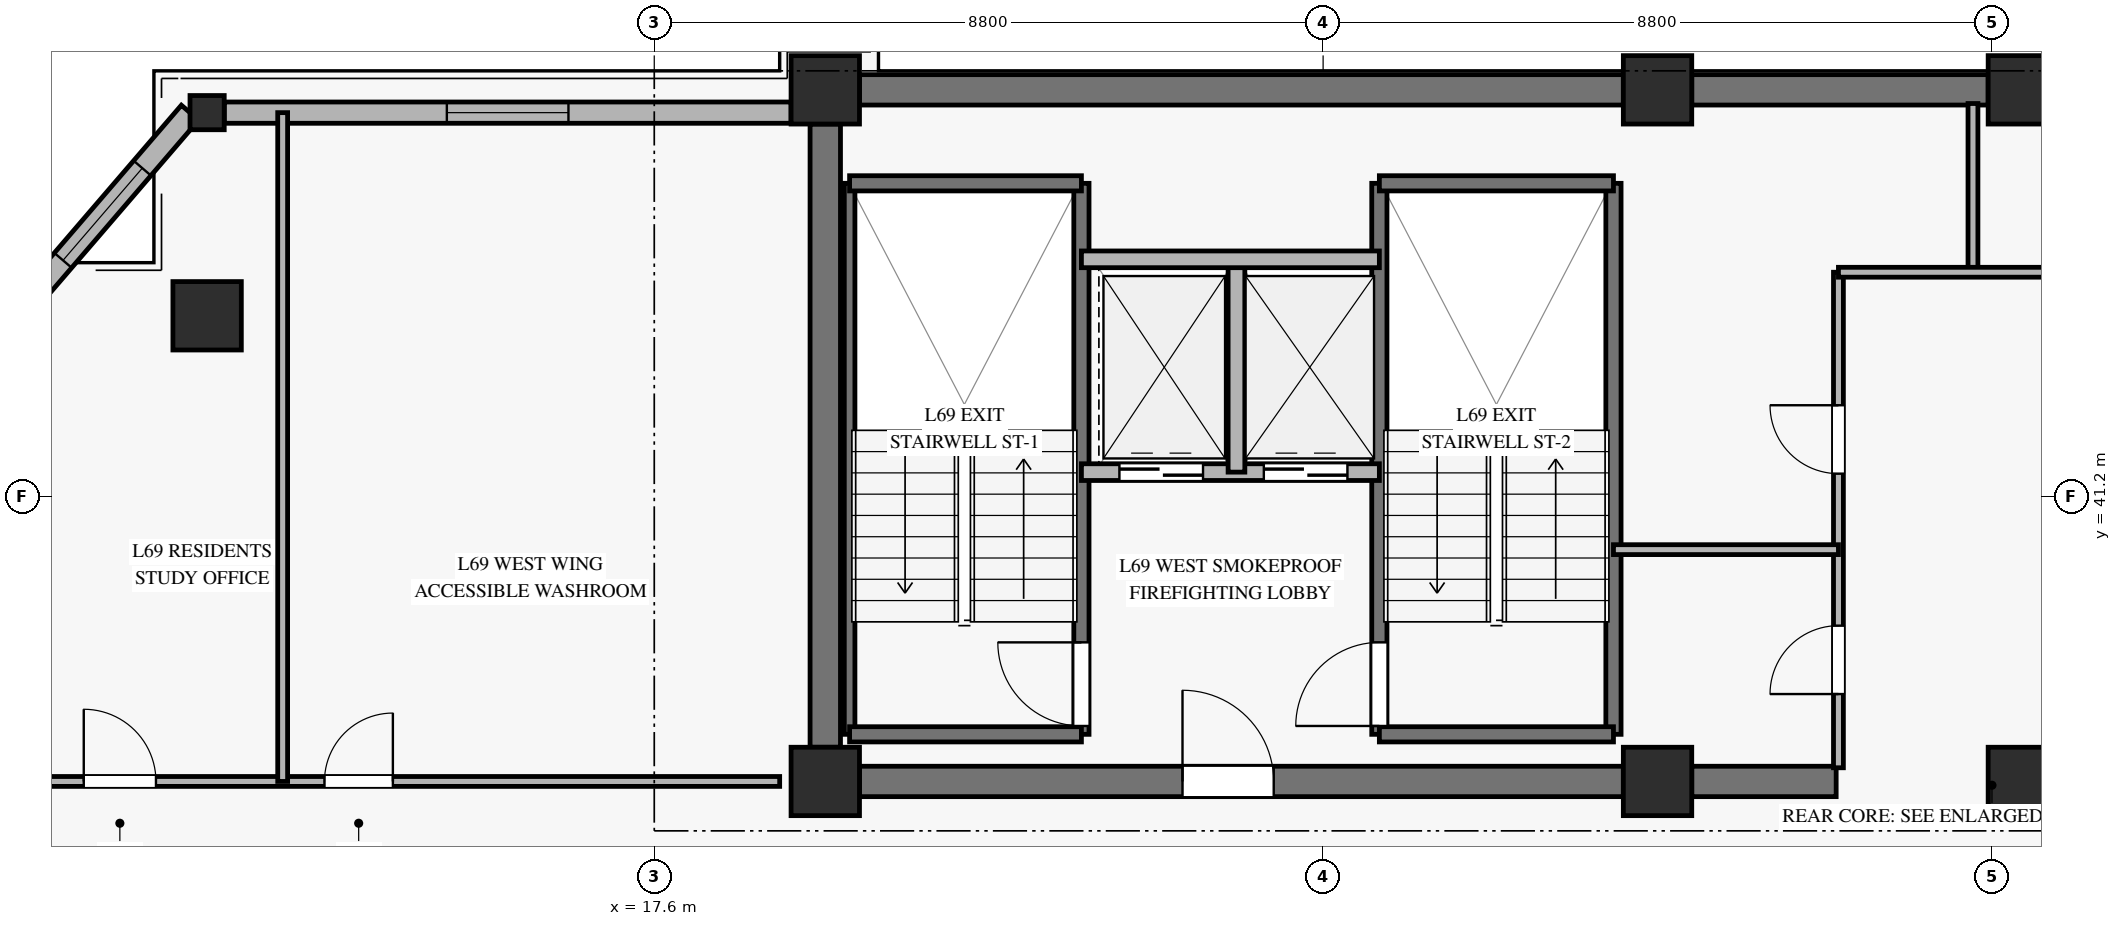
"""IFC4 building model, lengths in metres.
Left out: names, types, materials, properties, quantities, classifications, styles, units other than length and angle.
Written with IfcOpenShell. Run it as: python <this file> out.ifc"""

import sys

from ifc_helpers import new_model, si_unit, direction, frame, frame_2d, origin, origin_2d, place, context, subcontext, project, spatial, rectangle, hollow_rectangle, extrude, source, transform, mapped, element, fill, save


model = new_model("IFC4")
c1 = context("Model", 3, precision=1e-05, world=origin(), true_north=direction((0.0, 1.0)))
c2 = subcontext(c1, "Body", "Model", "MODEL_VIEW")
j1 = project(units=[si_unit("LENGTHUNIT", "METRE"), si_unit("PLANEANGLEUNIT", "RADIAN")], contexts=[c1])
p1 = place(None, origin())
s1 = spatial("IfcSite", under=j1, at=p1, CompositionType="ELEMENT")
p2 = place(p1, origin())
s2 = spatial("IfcBuilding", under=s1, at=p2, CompositionType="ELEMENT")
p3 = place(p2, frame((0.0, 0.0, 268.9)))
s3 = spatial("IfcBuildingStorey", under=s2, at=p3, CompositionType="ELEMENT", Elevation=268.9)
m1 = source(origin(), c2, "Body", "SweptSolid", [
    extrude(rectangle(XDim=0.9, YDim=0.9, at=origin_2d()), origin(), (0.0, 0.0, 1.0), 3.185),
])
for number, where, z_axis, x_axis in (
    (1, (19.85, 37.45, 0.0), (0.0, 0.0, 1.0), (1.0, 0.0, 0.0)),
    (2, (19.85, 46.55, 0.0), (0.0, 0.0, 1.0), (1.0, 0.0, 0.0)),
    (3, (30.8, 37.45, 0.0), (0.0, 0.0, 1.0), (1.0, 0.0, 0.0)),
    (4, (30.8, 46.55, 0.0), (0.0, 0.0, 1.0), (1.0, 0.0, 0.0)),
    (5, (35.6, 37.45, 0.0), (0.0, 0.0, 1.0), (1.0, 0.0, 0.0)),
    (6, (35.6, 46.55, 0.0), (0.0, 0.0, 1.0), (1.0, 0.0, 0.0)),
):
    element("IfcColumn", number, at=place(p3, frame(where, z_axis=z_axis, x_axis=x_axis)), inside=s3, PredefinedType="PILASTER", context=c2, shape_type="MappedRepresentation", body=[
        mapped(m1, transform((0.0, 0.0, 0.0), x_axis=(1.0, 0.0, 0.0), y_axis=(0.0, 1.0, 0.0), z_axis=(0.0, 0.0, 1.0), scale=1.0)),
    ])
p4 = place(p3, frame((20.3, 46.55, 0.0), z_axis=(0.0, 0.0, 1.0), x_axis=(1.0, 0.0, 0.0)))
e7 = element("IfcWall", 7, at=p4, inside=s3, PredefinedType="SHEAR", context=c2, shape_type="SweptSolid", body=[
    extrude(rectangle(XDim=10.05, YDim=0.4, at=frame_2d((5.025, 0.0))), origin(), (0.0, 0.0, 1.0), 3.185),
])
p5 = place(p3, frame((31.25, 46.55, 0.0), z_axis=(0.0, 0.0, 1.0), x_axis=(1.0, 0.0, 0.0)))
e8 = element("IfcWall", 8, at=p5, inside=s3, PredefinedType="SHEAR", context=c2, shape_type="SweptSolid", body=[
    extrude(rectangle(XDim=3.9, YDim=0.4, at=frame_2d((1.95, 0.0))), origin(), (0.0, 0.0, 1.0), 3.185),
])
p6 = place(p3, frame((20.3, 37.45, 0.0), z_axis=(0.0, 0.0, 1.0), x_axis=(1.0, 0.0, 0.0)))
e9 = element("IfcWall", 9, at=p6, inside=s3, PredefinedType="SHEAR", context=c2, shape_type="SweptSolid", body=[
    extrude(rectangle(XDim=10.05, YDim=0.4, at=frame_2d((5.025, 0.0))), origin(), (0.0, 0.0, 1.0), 3.185),
])
p7 = place(p6, frame((4.25, 0.0, 0.0)))
e10 = element("IfcOpeningElement", 10, at=p7, cuts=e9, PredefinedType="OPENING", context=c2, shape_type="SweptSolid", body=[
    extrude(rectangle(XDim=1.2, YDim=2.15, at=frame_2d((0.6, 1.075))), frame((0.0, 0.21, 0.0), z_axis=(0.0, -1.0, 0.0), x_axis=(1.0, 0.0, 0.0)), (0.0, 0.0, 1.0), 0.42),
])
p8 = place(p3, frame((31.25, 37.45, 0.0), z_axis=(0.0, 0.0, 1.0), x_axis=(1.0, 0.0, 0.0)))
e11 = element("IfcWall", 11, at=p8, inside=s3, PredefinedType="SHEAR", context=c2, shape_type="SweptSolid", body=[
    extrude(rectangle(XDim=1.9, YDim=0.4, at=frame_2d((0.95, 0.0))), origin(), (0.0, 0.0, 1.0), 3.185),
])
p9 = place(p3, frame((19.85, 37.9, 0.0), z_axis=(0.0, 0.0, 1.0), x_axis=(0.0, 1.0, 0.0)))
e12 = element("IfcWall", 12, at=p9, inside=s3, PredefinedType="SHEAR", context=c2, shape_type="SweptSolid", body=[
    extrude(rectangle(XDim=8.2, YDim=0.4, at=frame_2d((4.1, 0.0))), origin(), (0.0, 0.0, 1.0), 3.185),
])
m2 = source(origin(), c2, "Body", "SweptSolid", [
    extrude(hollow_rectangle(XDim=0.9, YDim=0.9, WallThickness=0.04, at=origin_2d()), origin(), (0.0, 0.0, 1.0), 3.185),
])
p10 = place(p3, frame((11.717, 43.577, 0.0), z_axis=(0.0, 0.0, 1.0), x_axis=(1.0, 0.0, 0.0)))
e13 = element("IfcColumn", 13, at=p10, inside=s3, PredefinedType="COLUMN", context=c2, shape_type="MappedRepresentation", body=[
    mapped(m2, transform((0.0, 0.0, 0.0), x_axis=(1.0, 0.0, 0.0), y_axis=(0.0, 1.0, 0.0), z_axis=(0.0, 0.0, 1.0), scale=1.0)),
])
m3 = source(origin(), c2, "Body", "SweptSolid", [
    extrude(hollow_rectangle(XDim=0.45, YDim=0.45, WallThickness=0.022, at=origin_2d()), origin(), (0.0, 0.0, 1.0), 3.185),
])
p11 = place(p3, frame((11.717, 46.25, 0.0), z_axis=(0.0, 0.0, 1.0), x_axis=(1.0, 0.0, 0.0)))
e14 = element("IfcColumn", 14, at=p11, inside=s3, PredefinedType="COLUMN", context=c2, shape_type="MappedRepresentation", body=[
    mapped(m3, transform((0.0, 0.0, 0.0), x_axis=(1.0, 0.0, 0.0), y_axis=(0.0, 1.0, 0.0), z_axis=(0.0, 0.0, 1.0), scale=1.0)),
])
p12 = place(p3, frame((11.942, 46.25, 0.0), z_axis=(0.0, 0.0, 1.0), x_axis=(1.0, 0.0, 0.0)))
e15 = element("IfcWall", 15, at=p12, inside=s3, PredefinedType="SOLIDWALL", context=c2, shape_type="SweptSolid", body=[
    extrude(rectangle(XDim=7.458, YDim=0.28, at=frame_2d((3.729, 0.0))), origin(), (0.0, 0.0, 1.0), 2.815),
])
p13 = place(p12, frame((2.929, 0.0, 0.45)))
e16 = element("IfcOpeningElement", 16, at=p13, cuts=e15, PredefinedType="OPENING", context=c2, shape_type="SweptSolid", body=[
    extrude(rectangle(XDim=1.6, YDim=2.0, at=frame_2d((0.8, 1.0))), frame((0.0, 0.15, 0.0), z_axis=(0.0, -1.0, 0.0), x_axis=(1.0, 0.0, 0.0)), (0.0, 0.0, 1.0), 0.3),
])
p14 = place(p3, frame((11.492, 46.25, 0.0), z_axis=(0.0, 0.0, 1.0), x_axis=(-0.651874424669, -0.75832693112, 0.0)))
e17 = element("IfcWall", 17, at=p14, inside=s3, PredefinedType="SOLIDWALL", context=c2, shape_type="SweptSolid", body=[
    extrude(rectangle(XDim=3.525, YDim=0.3, at=frame_2d((1.762, 0.0))), origin(), (0.0, 0.0, 1.0), 2.815),
])
p15 = place(p14, frame((0.963, 0.0, 0.45)))
e18 = element("IfcOpeningElement", 18, at=p15, cuts=e17, PredefinedType="OPENING", context=c2, shape_type="SweptSolid", body=[
    extrude(rectangle(XDim=1.6, YDim=2.0, at=frame_2d((0.8, 1.0))), frame((0.0, 0.16, 0.0), z_axis=(0.0, -1.0, 0.0), x_axis=(1.0, 0.0, 0.0)), (0.0, 0.0, 1.0), 0.32),
])
p16 = place(p3, frame((20.17, 38.07, 0.0), z_axis=(0.0, 0.0, 1.0), x_axis=(0.0, 1.0, 0.0)))
e19 = element("IfcWall", 19, at=p16, inside=s3, PredefinedType="SOLIDWALL", context=c2, shape_type="SweptSolid", body=[
    extrude(rectangle(XDim=7.25, YDim=0.14, at=frame_2d((3.625, 0.0))), origin(), (0.0, 0.0, 1.0), 3.4),
])
p17 = place(p3, frame((23.22, 38.07, 0.0), z_axis=(0.0, 0.0, 1.0), x_axis=(0.0, 1.0, 0.0)))
e20 = element("IfcWall", 20, at=p17, inside=s3, PredefinedType="SOLIDWALL", context=c2, shape_type="SweptSolid", body=[
    extrude(rectangle(XDim=7.25, YDim=0.2, at=frame_2d((3.625, 0.0))), origin(), (0.0, 0.0, 1.0), 3.4),
])
p18 = place(p17, frame((0.11, 0.0, 0.0)))
e21 = element("IfcOpeningElement", 21, at=p18, cuts=e20, PredefinedType="OPENING", context=c2, shape_type="SweptSolid", body=[
    extrude(rectangle(XDim=1.1, YDim=2.15, at=frame_2d((0.55, 1.075))), frame((0.0, 0.11, 0.0), z_axis=(0.0, -1.0, 0.0), x_axis=(1.0, 0.0, 0.0)), (0.0, 0.0, 1.0), 0.22),
])
for number, where, z_axis, x_axis in (
    (22, (20.17, 45.32, 0.0), (0.0, 0.0, 1.0), (1.0, 0.0, 0.0)),
    (23, (20.17, 38.07, 0.0), (0.0, 0.0, 1.0), (1.0, 0.0, 0.0)),
):
    element("IfcWall", number, at=place(p3, frame(where, z_axis=z_axis, x_axis=x_axis)), inside=s3, PredefinedType="SOLIDWALL", context=c2, shape_type="SweptSolid", body=[
        extrude(rectangle(XDim=3.05, YDim=0.2, at=frame_2d((1.525, 0.0))), origin(), (0.0, 0.0, 1.0), 3.4),
    ])
p19 = place(p3, frame((27.14, 38.07, 0.0), z_axis=(0.0, 0.0, 1.0), x_axis=(0.0, 1.0, 0.0)))
e24 = element("IfcWall", 24, at=p19, inside=s3, PredefinedType="SOLIDWALL", context=c2, shape_type="SweptSolid", body=[
    extrude(rectangle(XDim=7.25, YDim=0.2, at=frame_2d((3.625, 0.0))), origin(), (0.0, 0.0, 1.0), 3.4),
])
p20 = place(p19, frame((0.11, 0.0, 0.0)))
e25 = element("IfcOpeningElement", 25, at=p20, cuts=e24, PredefinedType="OPENING", context=c2, shape_type="SweptSolid", body=[
    extrude(rectangle(XDim=1.1, YDim=2.15, at=frame_2d((0.55, 1.075))), frame((0.0, 0.11, 0.0), z_axis=(0.0, -1.0, 0.0), x_axis=(1.0, 0.0, 0.0)), (0.0, 0.0, 1.0), 0.22),
])
p21 = place(p3, frame((30.22, 38.07, 0.0), z_axis=(0.0, 0.0, 1.0), x_axis=(0.0, 1.0, 0.0)))
e26 = element("IfcWall", 26, at=p21, inside=s3, PredefinedType="SOLIDWALL", context=c2, shape_type="SweptSolid", body=[
    extrude(rectangle(XDim=7.25, YDim=0.2, at=frame_2d((3.625, 0.0))), origin(), (0.0, 0.0, 1.0), 3.4),
])
for number, where, z_axis, x_axis in (
    (27, (27.14, 45.32, 0.0), (0.0, 0.0, 1.0), (1.0, 0.0, 0.0)),
    (28, (27.14, 38.07, 0.0), (0.0, 0.0, 1.0), (1.0, 0.0, 0.0)),
):
    element("IfcWall", number, at=place(p3, frame(where, z_axis=z_axis, x_axis=x_axis)), inside=s3, PredefinedType="SOLIDWALL", context=c2, shape_type="SweptSolid", body=[
        extrude(rectangle(XDim=3.08, YDim=0.2, at=frame_2d((1.54, 0.0))), origin(), (0.0, 0.0, 1.0), 3.4),
    ])
p22 = place(p3, frame((23.22, 41.52, 0.0), z_axis=(0.0, 0.0, 1.0), x_axis=(1.0, 0.0, 0.0)))
e29 = element("IfcWall", 29, at=p22, inside=s3, PredefinedType="SOLIDWALL", context=c2, shape_type="SweptSolid", body=[
    extrude(rectangle(XDim=3.92, YDim=0.22, at=frame_2d((1.96, 0.0))), origin(), (0.0, 0.0, 1.0), 3.185),
])
p23 = place(p22, frame((0.5, 0.0, 0.0)))
e30 = element("IfcOpeningElement", 30, at=p23, cuts=e29, PredefinedType="OPENING", context=c2, shape_type="SweptSolid", body=[
    extrude(rectangle(XDim=1.1, YDim=2.2, at=frame_2d((0.55, 1.1))), frame((0.0, 0.12, 0.0), z_axis=(0.0, -1.0, 0.0), x_axis=(1.0, 0.0, 0.0)), (0.0, 0.0, 1.0), 0.24),
])
p24 = place(p22, frame((2.4, 0.0, 0.0)))
e31 = element("IfcOpeningElement", 31, at=p24, cuts=e29, PredefinedType="OPENING", context=c2, shape_type="SweptSolid", body=[
    extrude(rectangle(XDim=1.1, YDim=2.2, at=frame_2d((0.55, 1.1))), frame((0.0, 0.12, 0.0), z_axis=(0.0, -1.0, 0.0), x_axis=(1.0, 0.0, 0.0)), (0.0, 0.0, 1.0), 0.24),
])
p25 = place(p3, frame((25.26, 41.52, 0.0), z_axis=(0.0, 0.0, 1.0), x_axis=(0.0, 1.0, 0.0)))
e32 = element("IfcWall", 32, at=p25, inside=s3, PredefinedType="SOLIDWALL", context=c2, shape_type="SweptSolid", body=[
    extrude(rectangle(XDim=2.8, YDim=0.22, at=frame_2d((1.4, 0.0))), origin(), (0.0, 0.0, 1.0), 3.185),
])
p26 = place(p3, frame((23.22, 44.32, 0.0), z_axis=(0.0, 0.0, 1.0), x_axis=(1.0, 0.0, 0.0)))
e33 = element("IfcWall", 33, at=p26, inside=s3, PredefinedType="SOLIDWALL", context=c2, shape_type="SweptSolid", body=[
    extrude(rectangle(XDim=3.92, YDim=0.22, at=frame_2d((1.96, 0.0))), origin(), (0.0, 0.0, 1.0), 3.185),
])
p27 = place(p3, frame((33.18, 37.63, 0.0), z_axis=(0.0, 0.0, 1.0), x_axis=(0.0, 1.0, 0.0)))
e34 = element("IfcWall", 34, at=p27, inside=s3, PredefinedType="PARTITIONING", context=c2, shape_type="SweptSolid", body=[
    extrude(rectangle(XDim=6.52, YDim=0.13, at=frame_2d((3.26, 0.0))), origin(), (0.0, 0.0, 1.0), 2.27),
])
p28 = place(p27, frame((0.97, 0.0, 0.0)))
e35 = element("IfcOpeningElement", 35, at=p28, cuts=e34, PredefinedType="OPENING", context=c2, shape_type="SweptSolid", body=[
    extrude(rectangle(XDim=0.9, YDim=2.1, at=frame_2d((0.45, 1.05))), frame((0.0, 0.075, 0.0), z_axis=(0.0, -1.0, 0.0), x_axis=(1.0, 0.0, 0.0)), (0.0, 0.0, 1.0), 0.15),
])
p29 = place(p27, frame((3.87, 0.0, 0.0)))
e36 = element("IfcOpeningElement", 36, at=p29, cuts=e34, PredefinedType="OPENING", context=c2, shape_type="SweptSolid", body=[
    extrude(rectangle(XDim=0.9, YDim=2.1, at=frame_2d((0.45, 1.05))), frame((0.0, 0.075, 0.0), z_axis=(0.0, -1.0, 0.0), x_axis=(1.0, 0.0, 0.0)), (0.0, 0.0, 1.0), 0.15),
])
p30 = place(p3, frame((34.95, 44.15, 0.0), z_axis=(0.0, 0.0, 1.0), x_axis=(0.0, 1.0, 0.0)))
e37 = element("IfcWall", 37, at=p30, inside=s3, PredefinedType="PARTITIONING", context=c2, shape_type="SweptSolid", body=[
    extrude(rectangle(XDim=2.22, YDim=0.13, at=frame_2d((1.11, 0.0))), origin(), (0.0, 0.0, 1.0), 3.185),
])
p31 = place(p3, frame((33.18, 44.15, 0.0), z_axis=(0.0, 0.0, 1.0), x_axis=(1.0, 0.0, 0.0)))
e38 = element("IfcWall", 38, at=p31, inside=s3, PredefinedType="PARTITIONING", context=c2, shape_type="SweptSolid", body=[
    extrude(rectangle(XDim=2.94, YDim=0.13, at=frame_2d((1.47, 0.0))), origin(), (0.0, 0.0, 1.0), 2.47),
])
p32 = place(p3, frame((30.22, 40.5, 0.0), z_axis=(0.0, 0.0, 1.0), x_axis=(1.0, 0.0, 0.0)))
e39 = element("IfcWall", 39, at=p32, inside=s3, PredefinedType="PARTITIONING", context=c2, shape_type="SweptSolid", body=[
    extrude(rectangle(XDim=2.96, YDim=0.13, at=frame_2d((1.48, 0.0))), origin(), (0.0, 0.0, 1.0), 2.47),
])
p33 = place(p3, frame((9.194, 37.45, 0.0), z_axis=(0.0, 0.0, 1.0), x_axis=(1.0, 0.0, 0.0)))
e40 = element("IfcWall", 40, at=p33, inside=s3, PredefinedType="PARTITIONING", context=c2, shape_type="SweptSolid", body=[
    extrude(rectangle(XDim=10.056, YDim=0.13, at=frame_2d((5.028, 0.0))), origin(), (0.0, 0.0, 1.0), 2.82),
])
p34 = place(p33, frame((0.9, 0.0, 0.0)))
e41 = element("IfcOpeningElement", 41, at=p34, cuts=e40, PredefinedType="OPENING", context=c2, shape_type="SweptSolid", body=[
    extrude(rectangle(XDim=0.95, YDim=2.1, at=frame_2d((0.475, 1.05))), frame((0.0, 0.075, 0.0), z_axis=(0.0, -1.0, 0.0), x_axis=(1.0, 0.0, 0.0)), (0.0, 0.0, 1.0), 0.15),
])
p35 = place(p33, frame((4.067, 0.0, 0.0)))
e42 = element("IfcOpeningElement", 42, at=p35, cuts=e40, PredefinedType="OPENING", context=c2, shape_type="SweptSolid", body=[
    extrude(rectangle(XDim=0.9, YDim=2.1, at=frame_2d((0.45, 1.05))), frame((0.0, 0.075, 0.0), z_axis=(0.0, -1.0, 0.0), x_axis=(1.0, 0.0, 0.0)), (0.0, 0.0, 1.0), 0.15),
])
p36 = place(p3, frame((12.711, 37.45, 0.0), z_axis=(0.0, 0.0, 1.0), x_axis=(0.0, 1.0, 0.0)))
e43 = element("IfcWall", 43, at=p36, inside=s3, PredefinedType="PARTITIONING", context=c2, shape_type="SweptSolid", body=[
    extrude(rectangle(XDim=8.8, YDim=0.13, at=frame_2d((4.4, 0.0))), origin(), (0.0, 0.0, 1.0), 3.185),
])
m4 = source(origin(), c2, "Body", "SweptSolid", [
    extrude(rectangle(XDim=1.6, YDim=2.0, at=frame_2d((0.8, 1.0))), frame((0.0, 0.03, 0.0), z_axis=(0.0, -1.0, 0.0), x_axis=(1.0, 0.0, 0.0)), (0.0, 0.0, 1.0), 0.06),
])
p37 = place(p13, origin())
e44 = element("IfcWindow", 44, at=p37, inside=s3, PartitioningType="SINGLE_PANEL", PredefinedType="WINDOW", context=c2, shape_type="MappedRepresentation", body=[
    mapped(m4, transform((0.0, 0.0, 0.0), x_axis=(1.0, 0.0, 0.0), y_axis=(0.0, 1.0, 0.0), z_axis=(0.0, 0.0, 1.0), scale=1.0)),
])
fill(e16, e44)
p38 = place(p15, origin())
e45 = element("IfcWindow", 45, at=p38, inside=s3, PartitioningType="SINGLE_PANEL", PredefinedType="WINDOW", context=c2, shape_type="MappedRepresentation", body=[
    mapped(m4, transform((0.0, 0.0, 0.0), x_axis=(1.0, 0.0, 0.0), y_axis=(0.0, 1.0, 0.0), z_axis=(0.0, 0.0, 1.0), scale=1.0)),
])
fill(e18, e45)
m5 = source(origin(), c2, "Body", "SweptSolid", [
    extrude(rectangle(XDim=1.1, YDim=2.15, at=frame_2d((0.55, 1.075))), frame((0.0, 0.025, 0.0), z_axis=(0.0, -1.0, 0.0), x_axis=(1.0, 0.0, 0.0)), (0.0, 0.0, 1.0), 0.05),
])
p39 = place(p18, origin())
e46 = element("IfcDoor", 46, at=p39, inside=s3, OperationType="SINGLE_SWING_RIGHT", PredefinedType="DOOR", context=c2, shape_type="MappedRepresentation", body=[
    mapped(m5, transform((0.0, 0.0, 0.0), x_axis=(1.0, 0.0, 0.0), y_axis=(0.0, 1.0, 0.0), z_axis=(0.0, 0.0, 1.0), scale=1.0)),
])
fill(e21, e46)
p40 = place(p20, origin())
e47 = element("IfcDoor", 47, at=p40, inside=s3, OperationType="SINGLE_SWING_LEFT", PredefinedType="DOOR", context=c2, shape_type="MappedRepresentation", body=[
    mapped(m5, transform((0.0, 0.0, 0.0), x_axis=(1.0, 0.0, 0.0), y_axis=(0.0, 1.0, 0.0), z_axis=(0.0, 0.0, 1.0), scale=1.0)),
])
fill(e25, e47)
m6 = source(origin(), c2, "Body", "SweptSolid", [
    extrude(rectangle(XDim=1.1, YDim=2.2, at=frame_2d((0.55, 1.1))), frame((0.0, 0.025, 0.0), z_axis=(0.0, -1.0, 0.0), x_axis=(1.0, 0.0, 0.0)), (0.0, 0.0, 1.0), 0.05),
])
p41 = place(p23, origin())
e48 = element("IfcDoor", 48, at=p41, inside=s3, OperationType="SLIDING_TO_LEFT", PredefinedType="DOOR", context=c2, shape_type="MappedRepresentation", body=[
    mapped(m6, transform((0.0, 0.0, 0.0), x_axis=(1.0, 0.0, 0.0), y_axis=(0.0, 1.0, 0.0), z_axis=(0.0, 0.0, 1.0), scale=1.0)),
])
fill(e30, e48)
p42 = place(p24, origin())
e49 = element("IfcDoor", 49, at=p42, inside=s3, OperationType="SLIDING_TO_LEFT", PredefinedType="DOOR", context=c2, shape_type="MappedRepresentation", body=[
    mapped(m6, transform((0.0, 0.0, 0.0), x_axis=(1.0, 0.0, 0.0), y_axis=(0.0, 1.0, 0.0), z_axis=(0.0, 0.0, 1.0), scale=1.0)),
])
fill(e31, e49)
m7 = source(origin(), c2, "Body", "SweptSolid", [
    extrude(rectangle(XDim=1.2, YDim=2.15, at=frame_2d((0.6, 1.075))), frame((0.0, 0.025, 0.0), z_axis=(0.0, -1.0, 0.0), x_axis=(1.0, 0.0, 0.0)), (0.0, 0.0, 1.0), 0.05),
])
p43 = place(p7, origin())
e50 = element("IfcDoor", 50, at=p43, inside=s3, OperationType="SINGLE_SWING_LEFT", PredefinedType="DOOR", context=c2, shape_type="MappedRepresentation", body=[
    mapped(m7, transform((0.0, 0.0, 0.0), x_axis=(1.0, 0.0, 0.0), y_axis=(0.0, 1.0, 0.0), z_axis=(0.0, 0.0, 1.0), scale=1.0)),
])
fill(e10, e50)
m8 = source(origin(), c2, "Body", "SweptSolid", [
    extrude(rectangle(XDim=0.9, YDim=2.1, at=frame_2d((0.45, 1.05))), frame((0.0, 0.025, 0.0), z_axis=(0.0, -1.0, 0.0), x_axis=(1.0, 0.0, 0.0)), (0.0, 0.0, 1.0), 0.05),
])
p44 = place(p28, origin())
e51 = element("IfcDoor", 51, at=p44, inside=s3, OperationType="SINGLE_SWING_LEFT", PredefinedType="DOOR", context=c2, shape_type="MappedRepresentation", body=[
    mapped(m8, transform((0.0, 0.0, 0.0), x_axis=(1.0, 0.0, 0.0), y_axis=(0.0, 1.0, 0.0), z_axis=(0.0, 0.0, 1.0), scale=1.0)),
])
fill(e35, e51)
p45 = place(p29, origin())
e52 = element("IfcDoor", 52, at=p45, inside=s3, OperationType="SINGLE_SWING_RIGHT", PredefinedType="DOOR", context=c2, shape_type="MappedRepresentation", body=[
    mapped(m8, transform((0.0, 0.0, 0.0), x_axis=(1.0, 0.0, 0.0), y_axis=(0.0, 1.0, 0.0), z_axis=(0.0, 0.0, 1.0), scale=1.0)),
])
fill(e36, e52)
m9 = source(origin(), c2, "Body", "SweptSolid", [
    extrude(rectangle(XDim=0.95, YDim=2.1, at=frame_2d((0.475, 1.05))), frame((0.0, 0.025, 0.0), z_axis=(0.0, -1.0, 0.0), x_axis=(1.0, 0.0, 0.0)), (0.0, 0.0, 1.0), 0.05),
])
p46 = place(p34, origin())
e53 = element("IfcDoor", 53, at=p46, inside=s3, OperationType="SINGLE_SWING_LEFT", PredefinedType="DOOR", context=c2, shape_type="MappedRepresentation", body=[
    mapped(m9, transform((0.0, 0.0, 0.0), x_axis=(1.0, 0.0, 0.0), y_axis=(0.0, 1.0, 0.0), z_axis=(0.0, 0.0, 1.0), scale=1.0)),
])
fill(e41, e53)
p47 = place(p35, origin())
e54 = element("IfcDoor", 54, at=p47, inside=s3, OperationType="SINGLE_SWING_RIGHT", PredefinedType="DOOR", context=c2, shape_type="MappedRepresentation", body=[
    mapped(m8, transform((0.0, 0.0, 0.0), x_axis=(1.0, 0.0, 0.0), y_axis=(0.0, 1.0, 0.0), z_axis=(0.0, 0.0, 1.0), scale=1.0)),
])
fill(e42, e54)
save(model, sys.argv[1])
